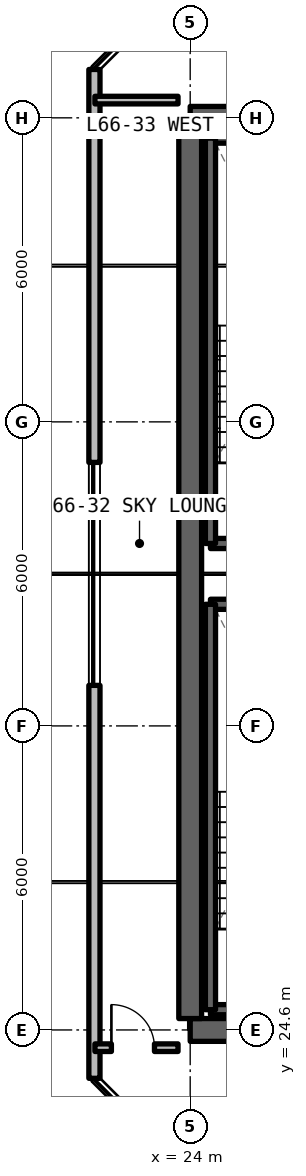
"""IFC4 building model, lengths in metres.
Left out: names, types, materials, properties, quantities, classifications, styles, units other than length and angle.
Written with IfcOpenShell. Run it as: python <this file> out.ifc"""

import sys

from ifc_helpers import new_model, si_unit, direction, frame, frame_2d, origin, place, context, subcontext, project, spatial, rectangle, extrude, element, fill, save


model = new_model("IFC4")
c1 = context("Model", 3, precision=1e-05, world=origin(), true_north=direction((0.0, 1.0)))
c2 = subcontext(c1, "Body", "Model", "MODEL_VIEW")
j1 = project(units=[si_unit("LENGTHUNIT", "METRE"), si_unit("PLANEANGLEUNIT", "RADIAN")], contexts=[c1])
p1 = place(None, origin())
s1 = spatial("IfcSite", under=j1, at=p1, CompositionType="ELEMENT")
p2 = place(p1, origin())
s2 = spatial("IfcBuilding", under=s1, at=p2, CompositionType="ELEMENT")
p3 = place(p2, frame((0.0, 0.0, 235.95)))
s3 = spatial("IfcBuildingStorey", under=s2, at=p3, CompositionType="ELEMENT", Elevation=235.95)
p4 = place(p3, frame((24.0, 24.6, 0.0), z_axis=(0.0, 0.0, 1.0), x_axis=(1.0, 0.0, 0.0)))
e1 = element("IfcWall", 1, at=p4, inside=s3, PredefinedType="SHEAR", context=c2, shape_type="SweptSolid", body=[
    extrude(rectangle(XDim=12.0, YDim=0.45, at=frame_2d((6.0, 0.0))), origin(), (0.0, 0.0, 1.0), 3.3),
])
p5 = place(p4, frame((7.2, 0.0, 0.0)))
e2 = element("IfcOpeningElement", 2, at=p5, cuts=e1, PredefinedType="OPENING", context=c2, shape_type="SweptSolid", body=[
    extrude(rectangle(XDim=1.0, YDim=2.15, at=frame_2d((0.5, 1.075))), frame((0.0, 0.235, 0.0), z_axis=(0.0, -1.0, 0.0), x_axis=(1.0, 0.0, 0.0)), (0.0, 0.0, 1.0), 0.47),
])
p6 = place(p3, frame((36.0, 42.6, 0.0), z_axis=(0.0, 0.0, 1.0), x_axis=(-1.0, 0.0, 0.0)))
e3 = element("IfcWall", 3, at=p6, inside=s3, PredefinedType="SHEAR", context=c2, shape_type="SweptSolid", body=[
    extrude(rectangle(XDim=12.0, YDim=0.45, at=frame_2d((6.0, 0.0))), origin(), (0.0, 0.0, 1.0), 3.3),
])
p7 = place(p6, frame((3.8, 0.0, 0.0)))
e4 = element("IfcOpeningElement", 4, at=p7, cuts=e3, PredefinedType="OPENING", context=c2, shape_type="SweptSolid", body=[
    extrude(rectangle(XDim=1.0, YDim=2.15, at=frame_2d((0.5, 1.075))), frame((0.0, 0.235, 0.0), z_axis=(0.0, -1.0, 0.0), x_axis=(1.0, 0.0, 0.0)), (0.0, 0.0, 1.0), 0.47),
])
p8 = place(p3, frame((24.0, 24.825, 0.0), z_axis=(0.0, 0.0, 1.0), x_axis=(0.0, 1.0, 0.0)))
e5 = element("IfcWall", 5, at=p8, inside=s3, PredefinedType="SHEAR", context=c2, shape_type="SweptSolid", body=[
    extrude(rectangle(XDim=17.55, YDim=0.45, at=frame_2d((8.775, 0.0))), origin(), (0.0, 0.0, 1.0), 3.3),
])
p9 = place(p3, frame((22.11, 43.554, 0.0), z_axis=(0.0, 0.0, 1.0), x_axis=(0.0, -1.0, 0.0)))
e6 = element("IfcWall", 6, at=p9, inside=s3, PredefinedType="SOLIDWALL", context=c2, shape_type="SweptSolid", body=[
    extrude(rectangle(XDim=19.909, YDim=0.22, at=frame_2d((9.955, 0.0))), origin(), (0.0, 0.0, 1.0), 3.08),
])
p10 = place(p9, frame((7.754, 0.0, 0.78)))
e7 = element("IfcOpeningElement", 7, at=p10, cuts=e6, PredefinedType="OPENING", context=c2, shape_type="SweptSolid", body=[
    extrude(rectangle(XDim=4.4, YDim=1.66, at=frame_2d((2.2, 0.83))), frame((0.0, 0.12, 0.0), z_axis=(0.0, -1.0, 0.0), x_axis=(1.0, 0.0, 0.0)), (0.0, 0.0, 1.0), 0.24),
])
p11 = place(p3, frame((22.12, 24.25, 0.0), z_axis=(0.0, 0.0, 1.0), x_axis=(1.0, 0.0, 0.0)))
e8 = element("IfcWall", 8, at=p11, inside=s3, PredefinedType="SOLIDWALL", context=c2, shape_type="SweptSolid", body=[
    extrude(rectangle(XDim=1.64, YDim=0.15, at=frame_2d((0.82, 0.0))), origin(), (0.0, 0.0, 1.0), 2.35),
])
p12 = place(p11, frame((0.325, 0.0, 0.0)))
e9 = element("IfcOpeningElement", 9, at=p12, cuts=e8, PredefinedType="OPENING", context=c2, shape_type="SweptSolid", body=[
    extrude(rectangle(XDim=0.85, YDim=2.1, at=frame_2d((0.425, 1.05))), frame((0.0, 0.085, 0.0), z_axis=(0.0, -1.0, 0.0), x_axis=(1.0, 0.0, 0.0)), (0.0, 0.0, 1.0), 0.17),
])
p13 = place(p3, frame((22.12, 42.95, 0.0), z_axis=(0.0, 0.0, 1.0), x_axis=(1.0, 0.0, 0.0)))
e10 = element("IfcWall", 10, at=p13, inside=s3, PredefinedType="SOLIDWALL", context=c2, shape_type="SweptSolid", body=[
    extrude(rectangle(XDim=1.64, YDim=0.15, at=frame_2d((0.82, 0.0))), origin(), (0.0, 0.0, 1.0), 2.35),
])
for number, where, z_axis, x_axis in (
    (11, (24.4, 25.0, 0.0), (0.0, 0.0, 1.0), (1.0, 0.0, 0.0)),
    (12, (27.8, 33.0, 0.0), (0.0, 0.0, 1.0), (-1.0, 0.0, 0.0)),
):
    element("IfcWall", number, at=place(p3, frame(where, z_axis=z_axis, x_axis=x_axis)), inside=s3, PredefinedType="SOLIDWALL", context=c2, shape_type="SweptSolid", body=[
        extrude(rectangle(XDim=3.4, YDim=0.2, at=frame_2d((1.7, 0.0))), origin(), (0.0, 0.0, 1.0), 3.3),
    ])
p14 = place(p3, frame((24.4, 33.0, 0.0), z_axis=(0.0, 0.0, 1.0), x_axis=(0.0, -1.0, 0.0)))
e13 = element("IfcWall", 13, at=p14, inside=s3, PredefinedType="SOLIDWALL", context=c2, shape_type="SweptSolid", body=[
    extrude(rectangle(XDim=8.0, YDim=0.2, at=frame_2d((4.0, 0.0))), origin(), (0.0, 0.0, 1.0), 3.3),
])
for number, where, z_axis, x_axis in (
    (14, (24.4, 34.2, 0.0), (0.0, 0.0, 1.0), (1.0, 0.0, 0.0)),
    (15, (27.8, 42.2, 0.0), (0.0, 0.0, 1.0), (-1.0, 0.0, 0.0)),
):
    element("IfcWall", number, at=place(p3, frame(where, z_axis=z_axis, x_axis=x_axis)), inside=s3, PredefinedType="SOLIDWALL", context=c2, shape_type="SweptSolid", body=[
        extrude(rectangle(XDim=3.4, YDim=0.2, at=frame_2d((1.7, 0.0))), origin(), (0.0, 0.0, 1.0), 3.3),
    ])
p15 = place(p3, frame((24.4, 42.2, 0.0), z_axis=(0.0, 0.0, 1.0), x_axis=(0.0, -1.0, 0.0)))
e16 = element("IfcWall", 16, at=p15, inside=s3, PredefinedType="SOLIDWALL", context=c2, shape_type="SweptSolid", body=[
    extrude(rectangle(XDim=8.0, YDim=0.2, at=frame_2d((4.0, 0.0))), origin(), (0.0, 0.0, 1.0), 3.3),
])
p16 = place(p10, origin())
e17 = element("IfcWindow", 17, at=p16, inside=s3, PartitioningType="SINGLE_PANEL", PredefinedType="WINDOW", context=c2, shape_type="SweptSolid", body=[
    extrude(rectangle(XDim=4.4, YDim=1.66, at=frame_2d((2.2, 0.83))), frame((0.0, 0.03, 0.0), z_axis=(0.0, -1.0, 0.0), x_axis=(1.0, 0.0, 0.0)), (0.0, 0.0, 1.0), 0.06),
])
fill(e7, e17)
p17 = place(p12, origin())
e18 = element("IfcDoor", 18, at=p17, inside=s3, OperationType="SINGLE_SWING_LEFT", PredefinedType="DOOR", context=c2, shape_type="SweptSolid", body=[
    extrude(rectangle(XDim=0.85, YDim=2.1, at=frame_2d((0.425, 1.05))), frame((0.0, 0.025, 0.0), z_axis=(0.0, -1.0, 0.0), x_axis=(1.0, 0.0, 0.0)), (0.0, 0.0, 1.0), 0.05),
])
fill(e9, e18)
save(model, sys.argv[1])
